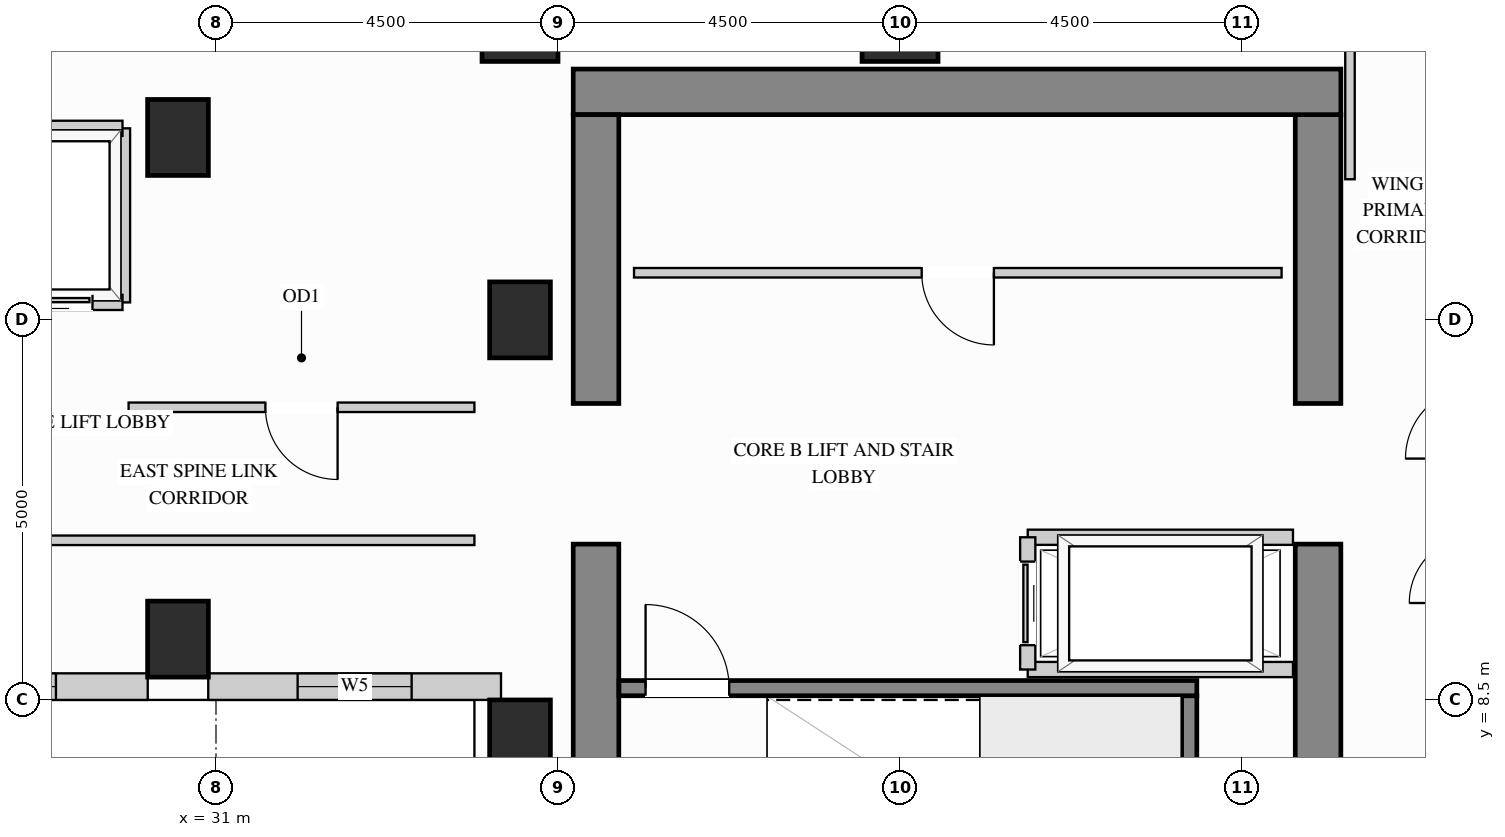
"""IFC4 building model, lengths in metres.
Left out: names, types, materials, properties, quantities, classifications, styles, units other than length and angle.
Written with IfcOpenShell. Run it as: python <this file> out.ifc"""

import sys

from ifc_helpers import new_model, si_unit, direction, frame, frame_2d, origin, origin_2d, place, context, subcontext, project, spatial, rectangle, extrude, source, transform, mapped, element, fill, save


model = new_model("IFC4")
c1 = context("Model", 3, precision=1e-05, world=origin(), true_north=direction((0.0, 1.0)))
c2 = subcontext(c1, "Body", "Model", "MODEL_VIEW")
j1 = project(units=[si_unit("LENGTHUNIT", "METRE"), si_unit("PLANEANGLEUNIT", "RADIAN")], contexts=[c1])
p1 = place(None, origin())
s1 = spatial("IfcSite", under=j1, at=p1, CompositionType="ELEMENT")
p2 = place(p1, origin())
s2 = spatial("IfcBuilding", under=s1, at=p2, CompositionType="ELEMENT")
p3 = place(p2, frame((0.0, 0.0, 168.3)))
s3 = spatial("IfcBuildingStorey", under=s2, at=p3, CompositionType="ELEMENT", Elevation=168.3)
m1 = source(origin(), c2, "Body", "SweptSolid", [
    extrude(rectangle(XDim=0.8, YDim=1.0, at=origin_2d()), origin(), (0.0, 0.0, 1.0), 3.4),
])
for number, where, z_axis, x_axis in (
    (1, (35.0, 13.5, 0.0), (0.0, 0.0, 1.0), (1.0, 0.0, 0.0)),
    (2, (35.0, 8.0, 0.0), (0.0, 0.0, 1.0), (1.0, 0.0, 0.0)),
    (3, (30.5, 15.9, 0.0), (0.0, 0.0, 1.0), (1.0, 0.0, 0.0)),
    (4, (30.5, 9.3, 0.0), (0.0, 0.0, 1.0), (1.0, 0.0, 0.0)),
):
    element("IfcColumn", number, at=place(p3, frame(where, z_axis=z_axis, x_axis=x_axis)), inside=s3, PredefinedType="COLUMN", context=c2, shape_type="MappedRepresentation", body=[
        mapped(m1, transform((0.0, 0.0, 0.0), x_axis=(1.0, 0.0, 0.0), y_axis=(0.0, 1.0, 0.0), z_axis=(0.0, 0.0, 1.0))),
    ])
m2 = source(origin(), c2, "Body", "SweptSolid", [
    extrude(rectangle(XDim=1.0, YDim=1.0, at=origin_2d()), origin(), (0.0, 0.0, 1.0), 3.4),
])
for number, where, z_axis, x_axis in (
    (5, (35.0, 17.4, 0.0), (0.0, 0.0, 1.0), (1.0, 0.0, 0.0)),
    (6, (40.0, 17.4, 0.0), (0.0, 0.0, 1.0), (1.0, 0.0, 0.0)),
):
    element("IfcColumn", number, at=place(p3, frame(where, z_axis=z_axis, x_axis=x_axis)), inside=s3, PredefinedType="COLUMN", context=c2, shape_type="MappedRepresentation", body=[
        mapped(m2, transform((0.0, 0.0, 0.0), x_axis=(1.0, 0.0, 0.0), y_axis=(0.0, 1.0, 0.0), z_axis=(0.0, 0.0, 1.0))),
    ])
m3 = source(origin(), c2, "Body", "SweptSolid", [
    extrude(rectangle(XDim=5.75, YDim=0.6, at=frame_2d((2.875, 0.0))), origin(), (0.0, 0.0, 1.0), 3.4),
])
p4 = place(p3, frame((45.5, 4.8, 0.0), z_axis=(0.0, 0.0, 1.0), x_axis=(0.0, 1.0, 0.0)))
e7 = element("IfcWall", 7, at=p4, inside=s3, PredefinedType="SHEAR", context=c2, shape_type="MappedRepresentation", body=[
    mapped(m3, transform((0.0, 0.0, 0.0), x_axis=(1.0, 0.0, 0.0), y_axis=(0.0, 1.0, 0.0), z_axis=(0.0, 0.0, 1.0))),
])
m4 = source(origin(), c2, "Body", "SweptSolid", [
    extrude(rectangle(XDim=3.8, YDim=0.6, at=frame_2d((1.9, 0.0))), origin(), (0.0, 0.0, 1.0), 3.4),
])
p5 = place(p3, frame((45.5, 12.4, 0.0), z_axis=(0.0, 0.0, 1.0), x_axis=(0.0, 1.0, 0.0)))
e8 = element("IfcWall", 8, at=p5, inside=s3, PredefinedType="SHEAR", context=c2, shape_type="MappedRepresentation", body=[
    mapped(m4, transform((0.0, 0.0, 0.0), x_axis=(1.0, 0.0, 0.0), y_axis=(0.0, 1.0, 0.0), z_axis=(0.0, 0.0, 1.0))),
])
m5 = source(origin(), c2, "Body", "SweptSolid", [
    extrude(rectangle(XDim=10.1, YDim=0.6, at=frame_2d((5.05, 0.0))), origin(), (0.0, 0.0, 1.0), 3.4),
])
p6 = place(p3, frame((35.7, 16.5, 0.0), z_axis=(0.0, 0.0, 1.0), x_axis=(1.0, 0.0, 0.0)))
e9 = element("IfcWall", 9, at=p6, inside=s3, PredefinedType="SHEAR", context=c2, shape_type="MappedRepresentation", body=[
    mapped(m5, transform((0.0, 0.0, 0.0), x_axis=(1.0, 0.0, 0.0), y_axis=(0.0, 1.0, 0.0), z_axis=(0.0, 0.0, 1.0))),
])
p7 = place(p3, frame((36.0, 4.8, 0.0), z_axis=(0.0, 0.0, 1.0), x_axis=(0.0, 1.0, 0.0)))
e10 = element("IfcWall", 10, at=p7, inside=s3, PredefinedType="SHEAR", context=c2, shape_type="MappedRepresentation", body=[
    mapped(m3, transform((0.0, 0.0, 0.0), x_axis=(1.0, 0.0, 0.0), y_axis=(0.0, 1.0, 0.0), z_axis=(0.0, 0.0, 1.0))),
])
p8 = place(p3, frame((36.0, 12.4, 0.0), z_axis=(0.0, 0.0, 1.0), x_axis=(0.0, 1.0, 0.0)))
e11 = element("IfcWall", 11, at=p8, inside=s3, PredefinedType="SHEAR", context=c2, shape_type="MappedRepresentation", body=[
    mapped(m4, transform((0.0, 0.0, 0.0), x_axis=(1.0, 0.0, 0.0), y_axis=(0.0, 1.0, 0.0), z_axis=(0.0, 0.0, 1.0))),
])
p9 = place(p3, frame((23.798, 8.675, 0.0), z_axis=(0.0, 0.0, 1.0), x_axis=(1.0, 0.0, 0.0)))
e12 = element("IfcWall", 12, at=p9, inside=s3, PredefinedType="SOLIDWALL", context=c2, shape_type="SweptSolid", body=[
    extrude(rectangle(XDim=6.304, YDim=0.35, at=frame_2d((3.152, 0.0))), origin(), (0.0, 0.0, 1.0), 3.385),
])
p10 = place(p9, frame((1.208, 0.0, 0.78)))
e13 = element("IfcOpeningElement", 13, at=p10, cuts=e12, PredefinedType="OPENING", context=c2, shape_type="SweptSolid", body=[
    extrude(rectangle(XDim=1.5, YDim=2.0, at=frame_2d((0.75, 1.0))), frame((0.0, 0.185, 0.0), z_axis=(0.0, -1.0, 0.0), x_axis=(1.0, 0.0, 0.0)), (0.0, 0.0, 1.0), 0.37),
])
p11 = place(p9, frame((3.596, 0.0, 0.78)))
e14 = element("IfcOpeningElement", 14, at=p11, cuts=e12, PredefinedType="OPENING", context=c2, shape_type="SweptSolid", body=[
    extrude(rectangle(XDim=1.5, YDim=2.0, at=frame_2d((0.75, 1.0))), frame((0.0, 0.185, 0.0), z_axis=(0.0, -1.0, 0.0), x_axis=(1.0, 0.0, 0.0)), (0.0, 0.0, 1.0), 0.37),
])
p12 = place(p3, frame((30.898, 8.675, 0.0), z_axis=(0.0, 0.0, 1.0), x_axis=(1.0, 0.0, 0.0)))
e15 = element("IfcWall", 15, at=p12, inside=s3, PredefinedType="SOLIDWALL", context=c2, shape_type="SweptSolid", body=[
    extrude(rectangle(XDim=3.852, YDim=0.35, at=frame_2d((1.926, 0.0))), origin(), (0.0, 0.0, 1.0), 3.385),
])
p13 = place(p12, frame((1.176, 0.0, 0.78)))
e16 = element("IfcOpeningElement", 16, at=p13, cuts=e15, PredefinedType="OPENING", context=c2, shape_type="SweptSolid", body=[
    extrude(rectangle(XDim=1.5, YDim=2.0, at=frame_2d((0.75, 1.0))), frame((0.0, 0.185, 0.0), z_axis=(0.0, -1.0, 0.0), x_axis=(1.0, 0.0, 0.0)), (0.0, 0.0, 1.0), 0.37),
])
p14 = place(p3, frame((36.5, 14.12, 0.0), z_axis=(0.0, 0.0, 1.0), x_axis=(1.0, 0.0, 0.0)))
e17 = element("IfcWall", 17, at=p14, inside=s3, PredefinedType="PARTITIONING", context=c2, shape_type="SweptSolid", body=[
    extrude(rectangle(XDim=8.52, YDim=0.125, at=frame_2d((4.26, 0.0))), origin(), (0.0, 0.0, 1.0), 3.385),
])
p15 = place(p14, frame((3.785, 0.0, 0.0)))
e18 = element("IfcOpeningElement", 18, at=p15, cuts=e17, PredefinedType="OPENING", context=c2, shape_type="SweptSolid", body=[
    extrude(rectangle(XDim=0.95, YDim=2.15, at=frame_2d((0.475, 1.075))), frame((0.0, 0.073, 0.0), z_axis=(0.0, -1.0, 0.0), x_axis=(1.0, 0.0, 0.0)), (0.0, 0.0, 1.0), 0.145),
])
m6 = source(origin(), c2, "Body", "SweptSolid", [
    extrude(rectangle(XDim=2.298, YDim=0.125, at=frame_2d((1.149, 0.0))), origin(), (0.0, 0.0, 1.0), 3.385),
])
p16 = place(p3, frame((45.92, 15.35, 0.0), z_axis=(0.0, 0.0, 1.0), x_axis=(0.0, 1.0, 0.0)))
e19 = element("IfcWall", 19, at=p16, inside=s3, PredefinedType="PARTITIONING", context=c2, shape_type="MappedRepresentation", body=[
    mapped(m6, transform((0.0, 0.0, 0.0), x_axis=(1.0, 0.0, 0.0), y_axis=(0.0, 1.0, 0.0), z_axis=(0.0, 0.0, 1.0))),
])
p17 = place(p3, frame((29.85, 12.35, 0.0), z_axis=(0.0, 0.0, 1.0), x_axis=(1.0, 0.0, 0.0)))
e20 = element("IfcWall", 20, at=p17, inside=s3, PredefinedType="PARTITIONING", context=c2, shape_type="SweptSolid", body=[
    extrude(rectangle(XDim=4.55, YDim=0.125, at=frame_2d((2.275, 0.0))), origin(), (0.0, 0.0, 1.0), 3.385),
])
p18 = place(p17, frame((1.8, 0.0, 0.0)))
e21 = element("IfcOpeningElement", 21, at=p18, cuts=e20, PredefinedType="OPENING", context=c2, shape_type="SweptSolid", body=[
    extrude(rectangle(XDim=0.95, YDim=2.15, at=frame_2d((0.475, 1.075))), frame((0.0, 0.073, 0.0), z_axis=(0.0, -1.0, 0.0), x_axis=(1.0, 0.0, 0.0)), (0.0, 0.0, 1.0), 0.145),
])
p19 = place(p3, frame((19.5, 10.6, 0.0), z_axis=(0.0, 0.0, 1.0), x_axis=(1.0, 0.0, 0.0)))
e22 = element("IfcWall", 22, at=p19, inside=s3, PredefinedType="PARTITIONING", context=c2, shape_type="SweptSolid", body=[
    extrude(rectangle(XDim=14.9, YDim=0.125, at=frame_2d((7.45, 0.0))), origin(), (0.0, 0.0, 1.0), 3.385),
])
p20 = place(p19, frame((6.975, 0.0, 0.0)))
e23 = element("IfcOpeningElement", 23, at=p20, cuts=e22, PredefinedType="OPENING", context=c2, shape_type="SweptSolid", body=[
    extrude(rectangle(XDim=0.95, YDim=2.15, at=frame_2d((0.475, 1.075))), frame((0.0, 0.073, 0.0), z_axis=(0.0, -1.0, 0.0), x_axis=(1.0, 0.0, 0.0)), (0.0, 0.0, 1.0), 0.145),
])
m7 = source(origin(), c2, "Body", "SweptSolid", [
    extrude(rectangle(XDim=2.29, YDim=0.2, at=frame_2d((1.145, 0.0))), origin(), (0.0, 0.0, 1.0), 3.385),
])
p21 = place(p3, frame((29.77, 13.73, 0.0), z_axis=(0.0, 0.0, 1.0), x_axis=(0.0, 1.0, 0.0)))
e24 = element("IfcWall", 24, at=p21, inside=s3, PredefinedType="PARTITIONING", context=c2, shape_type="MappedRepresentation", body=[
    mapped(m7, transform((0.0, 0.0, 0.0), x_axis=(1.0, 0.0, 0.0), y_axis=(0.0, 1.0, 0.0), z_axis=(0.0, 0.0, 1.0))),
])
m8 = source(origin(), c2, "Body", "SweptSolid", [
    extrude(rectangle(XDim=1.89, YDim=0.2, at=frame_2d((0.945, 0.0))), origin(), (0.0, 0.0, 1.0), 2.773),
])
p22 = place(p3, frame((27.88, 16.02, 0.0), z_axis=(0.0, 0.0, 1.0), x_axis=(1.0, 0.0, 0.0)))
e25 = element("IfcWall", 25, at=p22, inside=s3, PredefinedType="PARTITIONING", context=c2, shape_type="MappedRepresentation", body=[
    mapped(m8, transform((0.0, 0.0, 0.0), x_axis=(1.0, 0.0, 0.0), y_axis=(0.0, 1.0, 0.0), z_axis=(0.0, 0.0, 1.0))),
])
p23 = place(p3, frame((27.88, 13.73, 0.0), z_axis=(0.0, 0.0, 1.0), x_axis=(1.0, 0.0, 0.0)))
e26 = element("IfcWall", 26, at=p23, inside=s3, PredefinedType="PARTITIONING", context=c2, shape_type="SweptSolid", body=[
    extrude(rectangle(XDim=1.89, YDim=0.2, at=frame_2d((0.945, 0.0))), origin(), (0.0, 0.0, 1.0), 2.466),
])
p24 = place(p23, frame((0.395, 0.0, 0.0)))
e27 = element("IfcOpeningElement", 27, at=p24, cuts=e26, PredefinedType="OPENING", context=c2, shape_type="SweptSolid", body=[
    extrude(rectangle(XDim=1.1, YDim=2.2, at=frame_2d((0.55, 1.1))), frame((0.0, 0.11, 0.0), z_axis=(0.0, -1.0, 0.0), x_axis=(1.0, 0.0, 0.0)), (0.0, 0.0, 1.0), 0.22),
])
m9 = source(origin(), c2, "Body", "SweptSolid", [
    extrude(rectangle(XDim=3.49, YDim=0.2, at=frame_2d((1.745, 0.0))), origin(), (0.0, 0.0, 1.0), 3.385),
])
for number, where, z_axis, x_axis in (
    (28, (41.68, 10.64, 0.0), (0.0, 0.0, 1.0), (1.0, 0.0, 0.0)),
    (29, (41.68, 8.9, 0.0), (0.0, 0.0, 1.0), (1.0, 0.0, 0.0)),
):
    element("IfcWall", number, at=place(p3, frame(where, z_axis=z_axis, x_axis=x_axis)), inside=s3, PredefinedType="PARTITIONING", context=c2, shape_type="MappedRepresentation", body=[
        mapped(m9, transform((0.0, 0.0, 0.0), x_axis=(1.0, 0.0, 0.0), y_axis=(0.0, 1.0, 0.0), z_axis=(0.0, 0.0, 1.0))),
    ])
p25 = place(p3, frame((41.68, 8.9, 0.0), z_axis=(0.0, 0.0, 1.0), x_axis=(0.0, 1.0, 0.0)))
e30 = element("IfcWall", 30, at=p25, inside=s3, PredefinedType="PARTITIONING", context=c2, shape_type="SweptSolid", body=[
    extrude(rectangle(XDim=1.74, YDim=0.2, at=frame_2d((0.87, 0.0))), origin(), (0.0, 0.0, 1.0), 3.385),
])
p26 = place(p25, frame((0.32, 0.0, 0.0)))
e31 = element("IfcOpeningElement", 31, at=p26, cuts=e30, PredefinedType="OPENING", context=c2, shape_type="SweptSolid", body=[
    extrude(rectangle(XDim=1.1, YDim=2.2, at=frame_2d((0.55, 1.1))), frame((0.0, 0.11, 0.0), z_axis=(0.0, -1.0, 0.0), x_axis=(1.0, 0.0, 0.0)), (0.0, 0.0, 1.0), 0.22),
])
m10 = source(origin(), c2, "Body", "SweptSolid", [
    extrude(rectangle(XDim=3.753, YDim=0.2, at=frame_2d((1.876, 0.0))), origin(), (0.0, 0.0, 1.0), 3.4),
])
p27 = place(p3, frame((43.805, 4.802, 0.0), z_axis=(0.0, 0.0, 1.0), x_axis=(0.0, 1.0, 0.0)))
e32 = element("IfcWall", 32, at=p27, inside=s3, PredefinedType="SHEAR", context=c2, shape_type="MappedRepresentation", body=[
    mapped(m10, transform((0.0, 0.0, 0.0), x_axis=(1.0, 0.0, 0.0), y_axis=(0.0, 1.0, 0.0), z_axis=(0.0, 0.0, 1.0))),
])
p28 = place(p3, frame((36.302, 8.655, 0.0), z_axis=(0.0, 0.0, 1.0), x_axis=(1.0, 0.0, 0.0)))
e33 = element("IfcWall", 33, at=p28, inside=s3, PredefinedType="SHEAR", context=c2, shape_type="SweptSolid", body=[
    extrude(rectangle(XDim=7.603, YDim=0.2, at=frame_2d((3.802, 0.0))), origin(), (0.0, 0.0, 1.0), 3.4),
])
p29 = place(p28, frame((0.35, 0.0, 0.0)))
e34 = element("IfcOpeningElement", 34, at=p29, cuts=e33, PredefinedType="OPENING", context=c2, shape_type="SweptSolid", body=[
    extrude(rectangle(XDim=1.1, YDim=2.15, at=frame_2d((0.55, 1.075))), frame((0.0, 0.11, 0.0), z_axis=(0.0, -1.0, 0.0), x_axis=(1.0, 0.0, 0.0)), (0.0, 0.0, 1.0), 0.22),
])
m11 = source(origin(), c2, "Body", "SweptSolid", [
    extrude(rectangle(XDim=1.1, YDim=2.2, at=frame_2d((0.55, 1.1))), frame((0.0, 0.025, 0.0), z_axis=(0.0, -1.0, 0.0), x_axis=(1.0, 0.0, 0.0)), (0.0, 0.0, 1.0), 0.05),
])
p30 = place(p24, origin())
e35 = element("IfcDoor", 35, at=p30, inside=s3, OperationType="SLIDING_TO_LEFT", PredefinedType="DOOR", context=c2, shape_type="MappedRepresentation", body=[
    mapped(m11, transform((0.0, 0.0, 0.0), x_axis=(1.0, 0.0, 0.0), y_axis=(0.0, 1.0, 0.0), z_axis=(0.0, 0.0, 1.0))),
])
fill(e27, e35)
p31 = place(p26, origin())
e36 = element("IfcDoor", 36, at=p31, inside=s3, OperationType="SLIDING_TO_LEFT", PredefinedType="DOOR", context=c2, shape_type="MappedRepresentation", body=[
    mapped(m11, transform((0.0, 0.0, 0.0), x_axis=(1.0, 0.0, 0.0), y_axis=(0.0, 1.0, 0.0), z_axis=(0.0, 0.0, 1.0))),
])
fill(e31, e36)
m12 = source(origin(), c2, "Body", "SweptSolid", [
    extrude(rectangle(XDim=0.95, YDim=2.15, at=frame_2d((0.475, 1.075))), frame((0.0, 0.025, 0.0), z_axis=(0.0, -1.0, 0.0), x_axis=(1.0, 0.0, 0.0)), (0.0, 0.0, 1.0), 0.05),
])
p32 = place(p15, origin())
e37 = element("IfcDoor", 37, at=p32, inside=s3, OperationType="SINGLE_SWING_RIGHT", PredefinedType="DOOR", context=c2, shape_type="MappedRepresentation", body=[
    mapped(m12, transform((0.0, 0.0, 0.0), x_axis=(1.0, 0.0, 0.0), y_axis=(0.0, 1.0, 0.0), z_axis=(0.0, 0.0, 1.0))),
])
fill(e18, e37)
p33 = place(p18, origin())
e38 = element("IfcDoor", 38, at=p33, inside=s3, OperationType="SINGLE_SWING_RIGHT", PredefinedType="DOOR", context=c2, shape_type="MappedRepresentation", body=[
    mapped(m12, transform((0.0, 0.0, 0.0), x_axis=(1.0, 0.0, 0.0), y_axis=(0.0, 1.0, 0.0), z_axis=(0.0, 0.0, 1.0))),
])
fill(e21, e38)
m13 = source(origin(), c2, "Body", "SweptSolid", [
    extrude(rectangle(XDim=1.1, YDim=2.15, at=frame_2d((0.55, 1.075))), frame((0.0, 0.025, 0.0), z_axis=(0.0, -1.0, 0.0), x_axis=(1.0, 0.0, 0.0)), (0.0, 0.0, 1.0), 0.05),
])
p34 = place(p29, origin())
e39 = element("IfcDoor", 39, at=p34, inside=s3, OperationType="SINGLE_SWING_LEFT", PredefinedType="DOOR", context=c2, shape_type="MappedRepresentation", body=[
    mapped(m13, transform((0.0, 0.0, 0.0), x_axis=(1.0, 0.0, 0.0), y_axis=(0.0, 1.0, 0.0), z_axis=(0.0, 0.0, 1.0))),
])
fill(e34, e39)
m14 = source(origin(), c2, "Body", "SweptSolid", [
    extrude(rectangle(XDim=1.5, YDim=2.0, at=frame_2d((0.75, 1.0))), frame((0.0, 0.03, 0.0), z_axis=(0.0, -1.0, 0.0), x_axis=(1.0, 0.0, 0.0)), (0.0, 0.0, 1.0), 0.06),
])
p35 = place(p11, origin())
e40 = element("IfcWindow", 40, at=p35, inside=s3, PartitioningType="SINGLE_PANEL", PredefinedType="WINDOW", context=c2, shape_type="MappedRepresentation", body=[
    mapped(m14, transform((0.0, 0.0, 0.0), x_axis=(1.0, 0.0, 0.0), y_axis=(0.0, 1.0, 0.0), z_axis=(0.0, 0.0, 1.0))),
])
fill(e14, e40)
p36 = place(p13, origin())
e41 = element("IfcWindow", 41, at=p36, inside=s3, PartitioningType="SINGLE_PANEL", PredefinedType="WINDOW", context=c2, shape_type="MappedRepresentation", body=[
    mapped(m14, transform((0.0, 0.0, 0.0), x_axis=(1.0, 0.0, 0.0), y_axis=(0.0, 1.0, 0.0), z_axis=(0.0, 0.0, 1.0))),
])
fill(e16, e41)
save(model, sys.argv[1])
